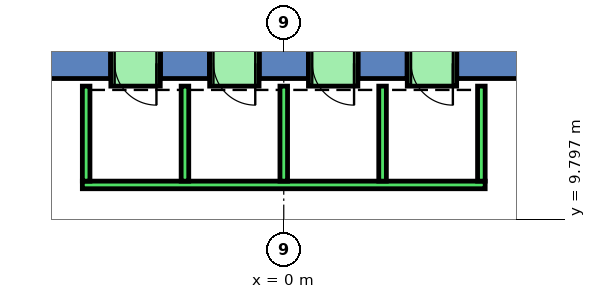
"""IFC4 building model, lengths in metres.
Left out: names, types, materials, properties, quantities, classifications, styles, units other than length and angle.
Written with IfcOpenShell. Run it as: python <this file> out.ifc"""

import sys

from ifc_helpers import new_model, si_unit, direction, frame, frame_2d, origin, place, context, subcontext, project, spatial, polyline, rectangle, outline, extrude, element, fill, save


model = new_model("IFC4")
c1 = context("Model", 3, precision=1e-05, world=origin(), true_north=direction((0.0, 1.0)))
c2 = subcontext(c1, "Body", "Model", "MODEL_VIEW")
j1 = project(units=[si_unit("LENGTHUNIT", "METRE"), si_unit("PLANEANGLEUNIT", "RADIAN")], contexts=[c1])
p1 = place(None, origin())
s1 = spatial("IfcSite", under=j1, at=p1, CompositionType="ELEMENT")
p2 = place(p1, origin())
s2 = spatial("IfcBuilding", under=s1, at=p2, CompositionType="ELEMENT")
p3 = place(p2, frame((0.0, 0.0, 25.0)))
s3 = spatial("IfcBuildingStorey", under=s2, at=p3, CompositionType="ELEMENT", Elevation=25.0)
p4 = place(p3, frame((0.0, 0.0, -0.45)))
e1 = element("IfcWall", 1, at=p4, inside=s3, PredefinedType="SHEAR", context=c2, shape_type="SweptSolid", body=[
    extrude(outline(polyline([(4.55, 14.5), (4.55, 13.5), (6.351, 13.5), (6.928, 14.5), (4.55, 14.5)])), origin(), (0.0, 0.0, 1.0), 5.0),
])
p5 = place(p3, frame((0.0, 0.0, -0.45)))
e2 = element("IfcWall", 2, at=p5, inside=s3, PredefinedType="SHEAR", context=c2, shape_type="SweptSolid", body=[
    extrude(outline(polyline([(1.95, 14.5), (1.95, 13.5), (3.25, 13.5), (3.25, 14.5), (1.95, 14.5)])), origin(), (0.0, 0.0, 1.0), 5.0),
])
p6 = place(p3, frame((0.0, 0.0, -0.45)))
e3 = element("IfcWall", 3, at=p6, inside=s3, PredefinedType="SHEAR", context=c2, shape_type="SweptSolid", body=[
    extrude(outline(polyline([(-0.65, 14.5), (-0.65, 13.5), (0.65, 13.5), (0.65, 14.5), (-0.65, 14.5)])), origin(), (0.0, 0.0, 1.0), 5.0),
])
p7 = place(p3, frame((0.0, 0.0, -0.45)))
e4 = element("IfcWall", 4, at=p7, inside=s3, PredefinedType="SHEAR", context=c2, shape_type="SweptSolid", body=[
    extrude(outline(polyline([(-3.25, 14.5), (-3.25, 13.5), (-1.95, 13.5), (-1.95, 14.5), (-3.25, 14.5)])), origin(), (0.0, 0.0, 1.0), 5.0),
])
p8 = place(p3, frame((0.0, 0.0, -0.45)))
e5 = element("IfcWall", 5, at=p8, inside=s3, PredefinedType="SHEAR", context=c2, shape_type="SweptSolid", body=[
    extrude(outline(polyline([(-4.55, 13.5), (-4.55, 14.5), (-6.928, 14.5), (-6.351, 13.5), (-4.55, 13.5)])), origin(), (0.0, 0.0, 1.0), 5.0),
])
p9 = place(p3, frame((0.0, 0.0, 3.6)))
e6 = element("IfcWall", 6, at=p9, inside=s3, PredefinedType="SHEAR", context=c2, shape_type="SweptSolid", body=[
    extrude(outline(polyline([(3.25, 14.5), (3.25, 13.5), (4.55, 13.5), (4.55, 14.5), (3.25, 14.5)])), origin(), (0.0, 0.0, 1.0), 0.95),
])
p10 = place(p3, frame((0.0, 0.0, 3.6)))
e7 = element("IfcWall", 7, at=p10, inside=s3, PredefinedType="SHEAR", context=c2, shape_type="SweptSolid", body=[
    extrude(outline(polyline([(0.65, 14.5), (0.65, 13.5), (1.95, 13.5), (1.95, 14.5), (0.65, 14.5)])), origin(), (0.0, 0.0, 1.0), 0.95),
])
p11 = place(p3, frame((0.0, 0.0, 3.6)))
e8 = element("IfcWall", 8, at=p11, inside=s3, PredefinedType="SHEAR", context=c2, shape_type="SweptSolid", body=[
    extrude(outline(polyline([(-1.95, 14.5), (-1.95, 13.5), (-0.65, 13.5), (-0.65, 14.5), (-1.95, 14.5)])), origin(), (0.0, 0.0, 1.0), 0.95),
])
p12 = place(p3, frame((0.0, 0.0, 3.6)))
e9 = element("IfcWall", 9, at=p12, inside=s3, PredefinedType="SHEAR", context=c2, shape_type="SweptSolid", body=[
    extrude(outline(polyline([(-4.55, 14.5), (-4.55, 13.5), (-3.25, 13.5), (-3.25, 14.5), (-4.55, 14.5)])), origin(), (0.0, 0.0, 1.0), 0.95),
])
p13 = place(p3, frame((5.3, 10.7, 0.0), z_axis=(0.0, 0.0, 1.0), x_axis=(-1.0, 0.0, 0.0)))
e10 = element("IfcWall", 10, at=p13, inside=s3, PredefinedType="STANDARD", context=c2, shape_type="SweptSolid", body=[
    extrude(rectangle(XDim=10.6, YDim=0.2, at=frame_2d((5.3, 0.0))), origin(), (0.0, 0.0, 1.0), 4.55),
])
for number, where, z_axis, x_axis in (
    (11, (5.2, 10.8, 0.0), (0.0, 0.0, 1.0), (0.0, 1.0, 0.0)),
    (12, (2.6, 10.8, 0.0), (0.0, 0.0, 1.0), (0.0, 1.0, 0.0)),
    (13, (0.0, 10.8, 0.0), (0.0, 0.0, 1.0), (0.0, 1.0, 0.0)),
    (14, (-2.6, 10.8, 0.0), (0.0, 0.0, 1.0), (0.0, 1.0, 0.0)),
    (15, (-5.2, 10.8, 0.0), (0.0, 0.0, 1.0), (0.0, 1.0, 0.0)),
):
    element("IfcWall", number, at=place(p3, frame(where, z_axis=z_axis, x_axis=x_axis)), inside=s3, PredefinedType="STANDARD", context=c2, shape_type="SweptSolid", body=[
        extrude(rectangle(XDim=2.5, YDim=0.2, at=frame_2d((1.25, 0.0))), origin(), (0.0, 0.0, 1.0), 4.55),
    ])
p14 = place(p3, frame((4.55, 13.9, 0.0), z_axis=(0.0, 0.0, 1.0), x_axis=(-1.0, 0.0, 0.0)))
e16 = element("IfcWall", 16, at=p14, inside=s3, PredefinedType="STANDARD", context=c2, shape_type="SweptSolid", body=[
    extrude(rectangle(XDim=1.3, YDim=1.2, at=frame_2d((0.65, 0.0))), origin(), (0.0, 0.0, 1.0), 2.4),
])
p15 = place(p14, frame((0.1, 0.0, 0.0)))
e17 = element("IfcOpeningElement", 17, at=p15, cuts=e16, PredefinedType="OPENING", context=c2, shape_type="SweptSolid", body=[
    extrude(rectangle(XDim=1.1, YDim=2.3, at=frame_2d((0.55, 1.15))), frame((0.0, 0.61, 0.0), z_axis=(0.0, -1.0, 0.0), x_axis=(1.0, 0.0, 0.0)), (0.0, 0.0, 1.0), 1.22),
])
p16 = place(p3, frame((1.95, 13.9, 0.0), z_axis=(0.0, 0.0, 1.0), x_axis=(-1.0, 0.0, 0.0)))
e18 = element("IfcWall", 18, at=p16, inside=s3, PredefinedType="STANDARD", context=c2, shape_type="SweptSolid", body=[
    extrude(rectangle(XDim=1.3, YDim=1.2, at=frame_2d((0.65, 0.0))), origin(), (0.0, 0.0, 1.0), 2.4),
])
p17 = place(p16, frame((0.1, 0.0, 0.0)))
e19 = element("IfcOpeningElement", 19, at=p17, cuts=e18, PredefinedType="OPENING", context=c2, shape_type="SweptSolid", body=[
    extrude(rectangle(XDim=1.1, YDim=2.3, at=frame_2d((0.55, 1.15))), frame((0.0, 0.61, 0.0), z_axis=(0.0, -1.0, 0.0), x_axis=(1.0, 0.0, 0.0)), (0.0, 0.0, 1.0), 1.22),
])
p18 = place(p3, frame((-0.65, 13.9, 0.0), z_axis=(0.0, 0.0, 1.0), x_axis=(-1.0, 0.0, 0.0)))
e20 = element("IfcWall", 20, at=p18, inside=s3, PredefinedType="STANDARD", context=c2, shape_type="SweptSolid", body=[
    extrude(rectangle(XDim=1.3, YDim=1.2, at=frame_2d((0.65, 0.0))), origin(), (0.0, 0.0, 1.0), 2.4),
])
p19 = place(p18, frame((0.1, 0.0, 0.0)))
e21 = element("IfcOpeningElement", 21, at=p19, cuts=e20, PredefinedType="OPENING", context=c2, shape_type="SweptSolid", body=[
    extrude(rectangle(XDim=1.1, YDim=2.3, at=frame_2d((0.55, 1.15))), frame((0.0, 0.61, 0.0), z_axis=(0.0, -1.0, 0.0), x_axis=(1.0, 0.0, 0.0)), (0.0, 0.0, 1.0), 1.22),
])
p20 = place(p3, frame((-3.25, 13.9, 0.0), z_axis=(0.0, 0.0, 1.0), x_axis=(-1.0, 0.0, 0.0)))
e22 = element("IfcWall", 22, at=p20, inside=s3, PredefinedType="STANDARD", context=c2, shape_type="SweptSolid", body=[
    extrude(rectangle(XDim=1.3, YDim=1.2, at=frame_2d((0.65, 0.0))), origin(), (0.0, 0.0, 1.0), 2.4),
])
p21 = place(p20, frame((0.1, 0.0, 0.0)))
e23 = element("IfcOpeningElement", 23, at=p21, cuts=e22, PredefinedType="OPENING", context=c2, shape_type="SweptSolid", body=[
    extrude(rectangle(XDim=1.1, YDim=2.3, at=frame_2d((0.55, 1.15))), frame((0.0, 0.61, 0.0), z_axis=(0.0, -1.0, 0.0), x_axis=(1.0, 0.0, 0.0)), (0.0, 0.0, 1.0), 1.22),
])
p22 = place(p15, origin())
e24 = element("IfcDoor", 24, at=p22, inside=s3, OperationType="SLIDING_TO_LEFT", PredefinedType="DOOR", context=c2, shape_type="SweptSolid", body=[
    extrude(rectangle(XDim=1.1, YDim=2.3, at=frame_2d((0.55, 1.15))), frame((0.0, 0.025, 0.0), z_axis=(0.0, -1.0, 0.0), x_axis=(1.0, 0.0, 0.0)), (0.0, 0.0, 1.0), 0.05),
])
fill(e17, e24)
p23 = place(p17, origin())
e25 = element("IfcDoor", 25, at=p23, inside=s3, OperationType="SLIDING_TO_LEFT", PredefinedType="DOOR", context=c2, shape_type="SweptSolid", body=[
    extrude(rectangle(XDim=1.1, YDim=2.3, at=frame_2d((0.55, 1.15))), frame((0.0, 0.025, 0.0), z_axis=(0.0, -1.0, 0.0), x_axis=(1.0, 0.0, 0.0)), (0.0, 0.0, 1.0), 0.05),
])
fill(e19, e25)
p24 = place(p19, origin())
e26 = element("IfcDoor", 26, at=p24, inside=s3, OperationType="SLIDING_TO_LEFT", PredefinedType="DOOR", context=c2, shape_type="SweptSolid", body=[
    extrude(rectangle(XDim=1.1, YDim=2.3, at=frame_2d((0.55, 1.15))), frame((0.0, 0.025, 0.0), z_axis=(0.0, -1.0, 0.0), x_axis=(1.0, 0.0, 0.0)), (0.0, 0.0, 1.0), 0.05),
])
fill(e21, e26)
p25 = place(p21, origin())
e27 = element("IfcDoor", 27, at=p25, inside=s3, OperationType="SLIDING_TO_LEFT", PredefinedType="DOOR", context=c2, shape_type="SweptSolid", body=[
    extrude(rectangle(XDim=1.1, YDim=2.3, at=frame_2d((0.55, 1.15))), frame((0.0, 0.025, 0.0), z_axis=(0.0, -1.0, 0.0), x_axis=(1.0, 0.0, 0.0)), (0.0, 0.0, 1.0), 0.05),
])
fill(e23, e27)
save(model, sys.argv[1])
